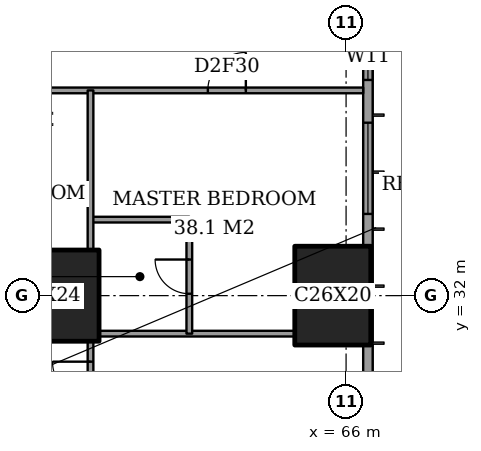
"""IFC4 building model, lengths in metres.
Left out: names, types, materials, properties, quantities, classifications, styles, units other than length and angle.
Written with IfcOpenShell. Run it as: python <this file> out.ifc"""

import sys

from ifc_helpers import new_model, si_unit, direction, frame, frame_2d, origin, origin_2d, place, context, subcontext, project, spatial, rectangle, extrude, element, fill, save


model = new_model("IFC4")
c1 = context("Model", 3, precision=1e-05, world=origin(), true_north=direction((0.0, 1.0)))
c2 = subcontext(c1, "Body", "Model", "MODEL_VIEW")
j1 = project(units=[si_unit("LENGTHUNIT", "METRE"), si_unit("PLANEANGLEUNIT", "RADIAN")], contexts=[c1])
p1 = place(None, origin())
s1 = spatial("IfcSite", under=j1, at=p1, CompositionType="ELEMENT")
p2 = place(p1, origin())
s2 = spatial("IfcBuilding", under=s1, at=p2, CompositionType="ELEMENT")
p3 = place(p2, frame((0.0, 0.0, 96.2)))
s3 = spatial("IfcBuildingStorey", under=s2, at=p3, CompositionType="ELEMENT", Elevation=96.2)
p4 = place(p3, frame((58.0, 32.0, 0.0), z_axis=(0.0, 0.0, 1.0), x_axis=(1.0, 0.0, 0.0)))
e1 = element("IfcColumn", 1, at=p4, inside=s3, PredefinedType="COLUMN", context=c2, shape_type="SweptSolid", body=[
    extrude(rectangle(XDim=3.0, YDim=2.4, at=origin_2d()), origin(), (0.0, 0.0, 1.0), 3.6),
])
p5 = place(p3, frame((65.65, 32.0, 0.0), z_axis=(0.0, 0.0, 1.0), x_axis=(0.0, 1.0, 0.0)))
e2 = element("IfcColumn", 2, at=p5, inside=s3, PredefinedType="COLUMN", context=c2, shape_type="SweptSolid", body=[
    extrude(rectangle(XDim=2.6, YDim=2.0, at=origin_2d()), origin(), (0.0, 0.0, 1.0), 3.6),
])
p6 = place(p3, frame((66.575, 3.175, 0.0), z_axis=(0.0, 0.0, 1.0), x_axis=(0.0, 1.0, 0.0)))
e3 = element("IfcWall", 3, at=p6, inside=s3, PredefinedType="SOLIDWALL", context=c2, shape_type="SweptSolid", body=[
    extrude(rectangle(XDim=41.65, YDim=0.25, at=frame_2d((20.825, 0.0))), origin(), (0.0, 0.0, 1.0), 3.6),
])
p7 = place(p6, frame((0.775, 0.0, 0.4)))
e4 = element("IfcOpeningElement", 4, at=p7, cuts=e3, PredefinedType="OPENING", context=c2, shape_type="SweptSolid", body=[
    extrude(rectangle(XDim=2.4, YDim=2.2, at=frame_2d((1.2, 1.1))), frame((0.0, 0.135, 0.0), z_axis=(0.0, -1.0, 0.0), x_axis=(1.0, 0.0, 0.0)), (0.0, 0.0, 1.0), 0.27),
])
p8 = place(p6, frame((6.1, 0.0, 0.4)))
e5 = element("IfcOpeningElement", 5, at=p8, cuts=e3, PredefinedType="OPENING", context=c2, shape_type="SweptSolid", body=[
    extrude(rectangle(XDim=1.2, YDim=2.2, at=frame_2d((0.6, 1.1))), frame((0.0, 0.135, 0.0), z_axis=(0.0, -1.0, 0.0), x_axis=(1.0, 0.0, 0.0)), (0.0, 0.0, 1.0), 0.27),
])
p9 = place(p6, frame((8.275, 0.0, 0.4)))
e6 = element("IfcOpeningElement", 6, at=p9, cuts=e3, PredefinedType="OPENING", context=c2, shape_type="SweptSolid", body=[
    extrude(rectangle(XDim=2.4, YDim=2.2, at=frame_2d((1.2, 1.1))), frame((0.0, 0.135, 0.0), z_axis=(0.0, -1.0, 0.0), x_axis=(1.0, 0.0, 0.0)), (0.0, 0.0, 1.0), 0.27),
])
p10 = place(p6, frame((15.775, 0.0, 0.4)))
e7 = element("IfcOpeningElement", 7, at=p10, cuts=e3, PredefinedType="OPENING", context=c2, shape_type="SweptSolid", body=[
    extrude(rectangle(XDim=2.4, YDim=2.2, at=frame_2d((1.2, 1.1))), frame((0.0, 0.135, 0.0), z_axis=(0.0, -1.0, 0.0), x_axis=(1.0, 0.0, 0.0)), (0.0, 0.0, 1.0), 0.27),
])
p11 = place(p6, frame((23.475, 0.0, 0.4)))
e8 = element("IfcOpeningElement", 8, at=p11, cuts=e3, PredefinedType="OPENING", context=c2, shape_type="SweptSolid", body=[
    extrude(rectangle(XDim=2.4, YDim=2.2, at=frame_2d((1.2, 1.1))), frame((0.0, 0.135, 0.0), z_axis=(0.0, -1.0, 0.0), x_axis=(1.0, 0.0, 0.0)), (0.0, 0.0, 1.0), 0.27),
])
p12 = place(p6, frame((30.975, 0.0, 0.4)))
e9 = element("IfcOpeningElement", 9, at=p12, cuts=e3, PredefinedType="OPENING", context=c2, shape_type="SweptSolid", body=[
    extrude(rectangle(XDim=2.4, YDim=2.2, at=frame_2d((1.2, 1.1))), frame((0.0, 0.135, 0.0), z_axis=(0.0, -1.0, 0.0), x_axis=(1.0, 0.0, 0.0)), (0.0, 0.0, 1.0), 0.27),
])
p13 = place(p6, frame((34.5, 0.0, 0.4)))
e10 = element("IfcOpeningElement", 10, at=p13, cuts=e3, PredefinedType="OPENING", context=c2, shape_type="SweptSolid", body=[
    extrude(rectangle(XDim=1.2, YDim=2.2, at=frame_2d((0.6, 1.1))), frame((0.0, 0.135, 0.0), z_axis=(0.0, -1.0, 0.0), x_axis=(1.0, 0.0, 0.0)), (0.0, 0.0, 1.0), 0.27),
])
p14 = place(p6, frame((38.475, 0.0, 0.4)))
e11 = element("IfcOpeningElement", 11, at=p14, cuts=e3, PredefinedType="OPENING", context=c2, shape_type="SweptSolid", body=[
    extrude(rectangle(XDim=2.4, YDim=2.2, at=frame_2d((1.2, 1.1))), frame((0.0, 0.135, 0.0), z_axis=(0.0, -1.0, 0.0), x_axis=(1.0, 0.0, 0.0)), (0.0, 0.0, 1.0), 0.27),
])
p15 = place(p3, frame((59.5, 31.0, 0.0), z_axis=(0.0, 0.0, 1.0), x_axis=(1.0, 0.0, 0.0)))
e12 = element("IfcWall", 12, at=p15, inside=s3, PredefinedType="PARTITIONING", context=c2, shape_type="SweptSolid", body=[
    extrude(rectangle(XDim=5.15, YDim=0.15, at=frame_2d((2.575, 0.0))), origin(), (0.0, 0.0, 1.0), 3.35),
])
p16 = place(p3, frame((59.275, 34.0, 0.0), z_axis=(0.0, 0.0, 1.0), x_axis=(1.0, 0.0, 0.0)))
e13 = element("IfcWall", 13, at=p16, inside=s3, PredefinedType="PARTITIONING", context=c2, shape_type="SweptSolid", body=[
    extrude(rectangle(XDim=2.6, YDim=0.15, at=frame_2d((1.3, 0.0))), origin(), (0.0, 0.0, 1.0), 3.35),
])
p17 = place(p3, frame((41.439, 37.4, 0.0), z_axis=(0.0, 0.0, 1.0), x_axis=(1.0, 0.0, 0.0)))
e14 = element("IfcWall", 14, at=p17, inside=s3, PredefinedType="PARTITIONING", context=c2, shape_type="SweptSolid", body=[
    extrude(rectangle(XDim=25.011, YDim=0.15, at=frame_2d((12.505, 0.0))), origin(), (0.0, 0.0, 1.0), 3.35),
])
p18 = place(p17, frame((11.961, 0.0, 0.0)))
e15 = element("IfcOpeningElement", 15, at=p18, cuts=e14, PredefinedType="OPENING", context=c2, shape_type="SweptSolid", body=[
    extrude(rectangle(XDim=1.0, YDim=2.1, at=frame_2d((0.5, 1.05))), frame((0.0, 0.085, 0.0), z_axis=(0.0, -1.0, 0.0), x_axis=(1.0, 0.0, 0.0)), (0.0, 0.0, 1.0), 0.17),
])
p19 = place(p17, frame((20.924, 0.0, 0.0)))
e16 = element("IfcOpeningElement", 16, at=p19, cuts=e14, PredefinedType="OPENING", context=c2, shape_type="SweptSolid", body=[
    extrude(rectangle(XDim=1.0, YDim=2.1, at=frame_2d((0.5, 1.05))), frame((0.0, 0.085, 0.0), z_axis=(0.0, -1.0, 0.0), x_axis=(1.0, 0.0, 0.0)), (0.0, 0.0, 1.0), 0.17),
])
p20 = place(p17, frame((15.249, 0.0, 0.0)))
e17 = element("IfcOpeningElement", 17, at=p20, cuts=e14, PredefinedType="OPENING", context=c2, shape_type="SweptSolid", body=[
    extrude(rectangle(XDim=0.9, YDim=2.1, at=frame_2d((0.45, 1.05))), frame((0.0, 0.085, 0.0), z_axis=(0.0, -1.0, 0.0), x_axis=(1.0, 0.0, 0.0)), (0.0, 0.0, 1.0), 0.17),
])
p21 = place(p17, frame((9.561, 0.0, 0.0)))
e18 = element("IfcOpeningElement", 18, at=p21, cuts=e14, PredefinedType="OPENING", context=c2, shape_type="SweptSolid", body=[
    extrude(rectangle(XDim=1.0, YDim=2.1, at=frame_2d((0.5, 1.05))), frame((0.0, 0.085, 0.0), z_axis=(0.0, -1.0, 0.0), x_axis=(1.0, 0.0, 0.0)), (0.0, 0.0, 1.0), 0.17),
])
p22 = place(p17, frame((7.161, 0.0, 0.0)))
e19 = element("IfcOpeningElement", 19, at=p22, cuts=e14, PredefinedType="OPENING", context=c2, shape_type="SweptSolid", body=[
    extrude(rectangle(XDim=1.0, YDim=2.1, at=frame_2d((0.5, 1.05))), frame((0.0, 0.085, 0.0), z_axis=(0.0, -1.0, 0.0), x_axis=(1.0, 0.0, 0.0)), (0.0, 0.0, 1.0), 0.17),
])
p23 = place(p17, frame((2.836, 0.0, 0.0)))
e20 = element("IfcOpeningElement", 20, at=p23, cuts=e14, PredefinedType="OPENING", context=c2, shape_type="SweptSolid", body=[
    extrude(rectangle(XDim=1.0, YDim=2.1, at=frame_2d((0.5, 1.05))), frame((0.0, 0.085, 0.0), z_axis=(0.0, -1.0, 0.0), x_axis=(1.0, 0.0, 0.0)), (0.0, 0.0, 1.0), 0.17),
])
p24 = place(p3, frame((59.275, 28.35, 0.0), z_axis=(0.0, 0.0, 1.0), x_axis=(0.0, 1.0, 0.0)))
e21 = element("IfcWall", 21, at=p24, inside=s3, PredefinedType="PARTITIONING", context=c2, shape_type="SweptSolid", body=[
    extrude(rectangle(XDim=2.45, YDim=0.15, at=frame_2d((1.225, 0.0))), origin(), (0.0, 0.0, 1.0), 3.35),
])
p25 = place(p24, frame((0.913, 0.0, 0.0)))
e22 = element("IfcOpeningElement", 22, at=p25, cuts=e21, PredefinedType="OPENING", context=c2, shape_type="SweptSolid", body=[
    extrude(rectangle(XDim=1.0, YDim=2.1, at=frame_2d((0.5, 1.05))), frame((0.0, 0.085, 0.0), z_axis=(0.0, -1.0, 0.0), x_axis=(1.0, 0.0, 0.0)), (0.0, 0.0, 1.0), 0.17),
])
p26 = place(p3, frame((59.275, 33.2, 0.0), z_axis=(0.0, 0.0, 1.0), x_axis=(0.0, 1.0, 0.0)))
e23 = element("IfcWall", 23, at=p26, inside=s3, PredefinedType="PARTITIONING", context=c2, shape_type="SweptSolid", body=[
    extrude(rectangle(XDim=4.2, YDim=0.15, at=frame_2d((2.1, 0.0))), origin(), (0.0, 0.0, 1.0), 3.35),
])
p27 = place(p3, frame((61.875, 31.0, 0.0), z_axis=(0.0, 0.0, 1.0), x_axis=(0.0, 1.0, 0.0)))
e24 = element("IfcWall", 24, at=p27, inside=s3, PredefinedType="PARTITIONING", context=c2, shape_type="SweptSolid", body=[
    extrude(rectangle(XDim=3.0, YDim=0.15, at=frame_2d((1.5, 0.0))), origin(), (0.0, 0.0, 1.0), 3.35),
])
p28 = place(p27, frame((1.05, 0.0, 0.0)))
e25 = element("IfcOpeningElement", 25, at=p28, cuts=e24, PredefinedType="OPENING", context=c2, shape_type="SweptSolid", body=[
    extrude(rectangle(XDim=0.9, YDim=2.1, at=frame_2d((0.45, 1.05))), frame((0.0, 0.085, 0.0), z_axis=(0.0, -1.0, 0.0), x_axis=(1.0, 0.0, 0.0)), (0.0, 0.0, 1.0), 0.17),
])
p29 = place(p12, origin())
e26 = element("IfcWindow", 26, at=p29, inside=s3, PartitioningType="SINGLE_PANEL", PredefinedType="WINDOW", context=c2, shape_type="SweptSolid", body=[
    extrude(rectangle(XDim=2.4, YDim=2.2, at=frame_2d((1.2, 1.1))), frame((0.0, 0.03, 0.0), z_axis=(0.0, -1.0, 0.0), x_axis=(1.0, 0.0, 0.0)), (0.0, 0.0, 1.0), 0.06),
])
fill(e9, e26)
p30 = place(p13, origin())
e27 = element("IfcWindow", 27, at=p30, inside=s3, PartitioningType="SINGLE_PANEL", PredefinedType="WINDOW", context=c2, shape_type="SweptSolid", body=[
    extrude(rectangle(XDim=1.2, YDim=2.2, at=frame_2d((0.6, 1.1))), frame((0.0, 0.03, 0.0), z_axis=(0.0, -1.0, 0.0), x_axis=(1.0, 0.0, 0.0)), (0.0, 0.0, 1.0), 0.06),
])
fill(e10, e27)
p31 = place(p28, origin())
e28 = element("IfcDoor", 28, at=p31, inside=s3, OperationType="SINGLE_SWING_LEFT", PredefinedType="DOOR", context=c2, shape_type="SweptSolid", body=[
    extrude(rectangle(XDim=0.9, YDim=2.1, at=frame_2d((0.45, 1.05))), frame((0.0, 0.025, 0.0), z_axis=(0.0, -1.0, 0.0), x_axis=(1.0, 0.0, 0.0)), (0.0, 0.0, 1.0), 0.05),
])
fill(e25, e28)
p32 = place(p19, origin())
e29 = element("IfcDoor", 29, at=p32, inside=s3, OperationType="SINGLE_SWING_LEFT", PredefinedType="DOOR", context=c2, shape_type="SweptSolid", body=[
    extrude(rectangle(XDim=1.0, YDim=2.1, at=frame_2d((0.5, 1.05))), frame((0.0, 0.025, 0.0), z_axis=(0.0, -1.0, 0.0), x_axis=(1.0, 0.0, 0.0)), (0.0, 0.0, 1.0), 0.05),
])
fill(e16, e29)
p33 = place(p25, origin())
e30 = element("IfcDoor", 30, at=p33, inside=s3, OperationType="SINGLE_SWING_LEFT", PredefinedType="DOOR", context=c2, shape_type="SweptSolid", body=[
    extrude(rectangle(XDim=1.0, YDim=2.1, at=frame_2d((0.5, 1.05))), frame((0.0, 0.025, 0.0), z_axis=(0.0, -1.0, 0.0), x_axis=(1.0, 0.0, 0.0)), (0.0, 0.0, 1.0), 0.05),
])
fill(e22, e30)
save(model, sys.argv[1])
